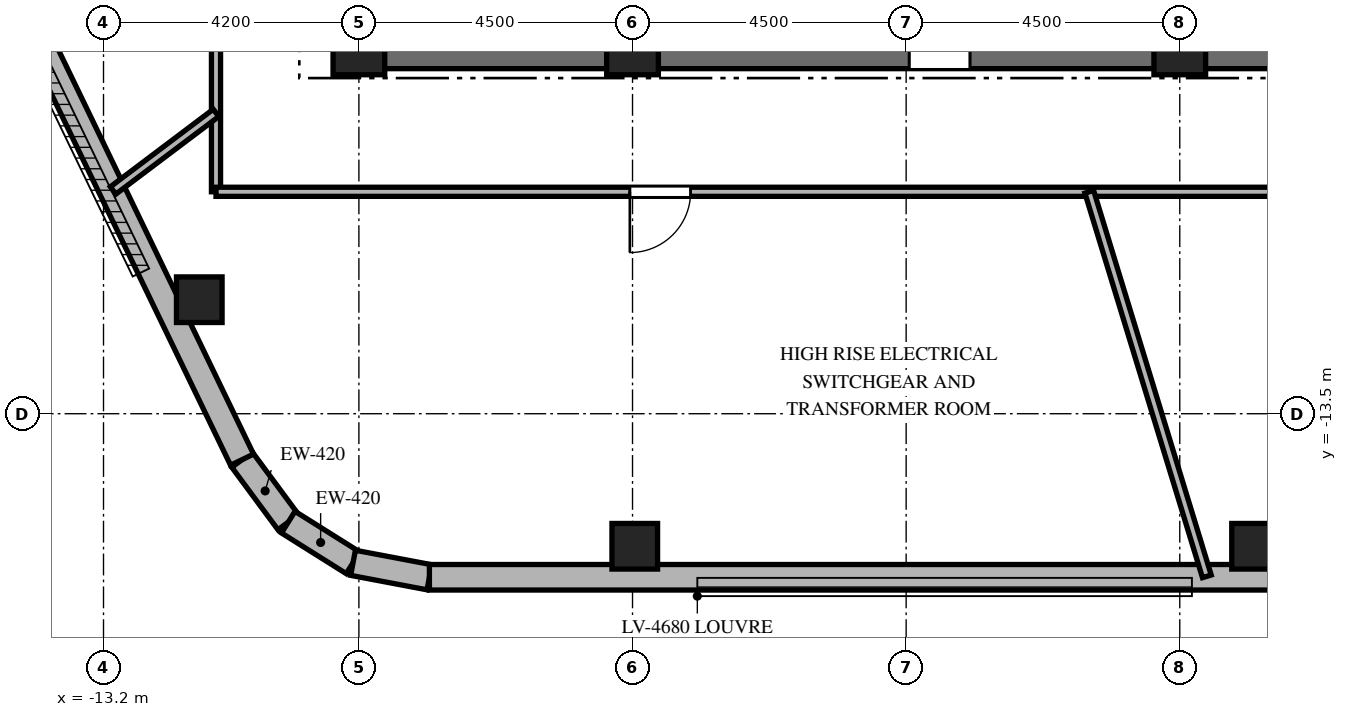
"""IFC4 building model, lengths in metres.
Left out: names, types, materials, properties, quantities, classifications, styles, units other than length and angle.
Written with IfcOpenShell. Run it as: python <this file> out.ifc"""

import sys

from ifc_helpers import new_model, si_unit, direction, frame, frame_2d, origin, origin_2d, place, context, subcontext, project, spatial, rectangle, extrude, element, fill, save


model = new_model("IFC4")
c1 = context("Model", 3, precision=1e-05, world=origin(), true_north=direction((0.0, 1.0)))
c2 = subcontext(c1, "Body", "Model", "MODEL_VIEW")
j1 = project(units=[si_unit("LENGTHUNIT", "METRE"), si_unit("PLANEANGLEUNIT", "RADIAN")], contexts=[c1])
p1 = place(None, origin())
s1 = spatial("IfcSite", under=j1, at=p1, CompositionType="ELEMENT")
p2 = place(p1, origin())
s2 = spatial("IfcBuilding", under=s1, at=p2, CompositionType="ELEMENT")
p3 = place(p2, frame((0.0, 0.0, 315.9)))
s3 = spatial("IfcBuildingStorey", under=s2, at=p3, CompositionType="ELEMENT", Elevation=315.9)
p4 = place(p3, frame((-9.325, -7.5, 0.0), z_axis=(0.0, 0.0, 1.0), x_axis=(1.0, 0.0, 0.0)))
e1 = element("IfcWall", 1, at=p4, inside=s3, PredefinedType="SHEAR", context=c2, shape_type="SweptSolid", body=[
    extrude(rectangle(XDim=18.65, YDim=0.65, at=frame_2d((9.325, 0.0))), origin(), (0.0, 0.0, 1.0), 5.5),
])
p5 = place(p4, frame((9.375, 0.0, 0.0)))
e2 = element("IfcOpeningElement", 2, at=p5, cuts=e1, PredefinedType="OPENING", context=c2, shape_type="SweptSolid", body=[
    extrude(rectangle(XDim=1.0, YDim=2.15, at=frame_2d((0.5, 1.075))), frame((0.0, 0.335, 0.0), z_axis=(0.0, -1.0, 0.0), x_axis=(1.0, 0.0, 0.0)), (0.0, 0.0, 1.0), 0.67),
])
for number, where, z_axis, x_axis in (
    (3, (-9.0, -7.5, 0.0), (0.0, 0.0, 1.0), (1.0, 0.0, 0.0)),
    (4, (-4.5, -7.5, 0.0), (0.0, 0.0, 1.0), (1.0, 0.0, 0.0)),
    (5, (4.5, -7.5, 0.0), (0.0, 0.0, 1.0), (1.0, 0.0, 0.0)),
):
    element("IfcColumn", number, at=place(p3, frame(where, z_axis=z_axis, x_axis=x_axis)), inside=s3, PredefinedType="COLUMN", context=c2, shape_type="SweptSolid", body=[
        extrude(rectangle(XDim=0.85, YDim=0.85, at=origin_2d()), origin(), (0.0, 0.0, 1.0), 5.5),
    ])
for number, where, z_axis, x_axis in (
    (6, (-4.463, -15.68, 0.0), (0.0, 0.0, 1.0), (1.0, 0.0, 0.0)),
    (7, (5.73, -15.68, 0.0), (0.0, 0.0, 1.0), (1.0, 0.0, 0.0)),
    (8, (-11.625, -11.625, 0.0), (0.0, 0.0, 1.0), (1.0, 0.0, 0.0)),
):
    element("IfcColumn", number, at=place(p3, frame(where, z_axis=z_axis, x_axis=x_axis)), inside=s3, PredefinedType="COLUMN", context=c2, shape_type="SweptSolid", body=[
        extrude(rectangle(XDim=0.75, YDim=0.75, at=origin_2d()), origin(), (0.0, 0.0, 1.0), 5.5),
    ])
p6 = place(p3, frame((-10.922, -14.256, 0.0), z_axis=(0.0, 0.0, 1.0), x_axis=(0.594423284796, -0.804152322941, 0.0)))
e9 = element("IfcWall", 9, at=p6, inside=s3, PredefinedType="SOLIDWALL", context=c2, shape_type="SweptSolid", body=[
    extrude(rectangle(XDim=1.278, YDim=0.42, at=frame_2d((0.639, 0.0))), origin(), (0.0, 0.0, 1.0), 5.18),
])
p7 = place(p3, frame((-10.162, -15.284, 0.0), z_axis=(0.0, 0.0, 1.0), x_axis=(0.846993641169, -0.53160302089, 0.0)))
e10 = element("IfcWall", 10, at=p7, inside=s3, PredefinedType="SOLIDWALL", context=c2, shape_type="SweptSolid", body=[
    extrude(rectangle(XDim=1.258, YDim=0.42, at=frame_2d((0.629, 0.0))), origin(), (0.0, 0.0, 1.0), 5.18),
])
p8 = place(p3, frame((-9.096, -15.952, 0.0), z_axis=(0.0, 0.0, 1.0), x_axis=(0.982583442004, -0.185821902637, 0.0)))
e11 = element("IfcWall", 11, at=p8, inside=s3, PredefinedType="SOLIDWALL", context=c2, shape_type="SweptSolid", body=[
    extrude(rectangle(XDim=1.278, YDim=0.42, at=frame_2d((0.639, 0.0))), origin(), (0.0, 0.0, 1.0), 5.18),
])
p9 = place(p3, frame((-7.84, -16.19, 0.0), z_axis=(0.0, 0.0, 1.0), x_axis=(1.0, 0.0, 0.0)))
e12 = element("IfcWall", 12, at=p9, inside=s3, PredefinedType="SOLIDWALL", context=c2, shape_type="SweptSolid", body=[
    extrude(rectangle(XDim=16.946, YDim=0.42, at=frame_2d((8.473, 0.0))), origin(), (0.0, 0.0, 1.0), 5.18),
])
p10 = place(p3, frame((-16.763, -2.152, 0.0), z_axis=(0.0, 0.0, 1.0), x_axis=(0.434664735238, -0.900592342817, 0.0)))
e13 = element("IfcWall", 13, at=p10, inside=s3, PredefinedType="SOLIDWALL", context=c2, shape_type="SweptSolid", body=[
    extrude(rectangle(XDim=13.44, YDim=0.42, at=frame_2d((6.72, 0.0))), origin(), (0.0, 0.0, 1.0), 5.18),
])
p11 = place(p3, frame((-11.35, -9.85, 0.0), z_axis=(0.0, 0.0, 1.0), x_axis=(0.0, 1.0, 0.0)))
e14 = element("IfcWall", 14, at=p11, inside=s3, PredefinedType="PARTITIONING", context=c2, shape_type="SweptSolid", body=[
    extrude(rectangle(XDim=19.7, YDim=0.15, at=frame_2d((9.85, 0.0))), origin(), (0.0, 0.0, 1.0), 4.67),
])
p12 = place(p11, frame((17.84, 0.0, 0.0)))
e15 = element("IfcOpeningElement", 15, at=p12, cuts=e14, PredefinedType="OPENING", context=c2, shape_type="SweptSolid", body=[
    extrude(rectangle(XDim=1.0, YDim=2.15, at=frame_2d((0.5, 1.075))), frame((0.0, 0.085, 0.0), z_axis=(0.0, -1.0, 0.0), x_axis=(1.0, 0.0, 0.0)), (0.0, 0.0, 1.0), 0.17),
])
p13 = place(p11, frame((8.752, 0.0, 0.0)))
e16 = element("IfcOpeningElement", 16, at=p13, cuts=e14, PredefinedType="OPENING", context=c2, shape_type="SweptSolid", body=[
    extrude(rectangle(XDim=1.0, YDim=2.15, at=frame_2d((0.5, 1.075))), frame((0.0, 0.085, 0.0), z_axis=(0.0, -1.0, 0.0), x_axis=(1.0, 0.0, 0.0)), (0.0, 0.0, 1.0), 0.17),
])
p14 = place(p3, frame((11.35, -9.85, 0.0), z_axis=(0.0, 0.0, 1.0), x_axis=(-1.0, 0.0, 0.0)))
e17 = element("IfcWall", 17, at=p14, inside=s3, PredefinedType="PARTITIONING", context=c2, shape_type="SweptSolid", body=[
    extrude(rectangle(XDim=22.7, YDim=0.15, at=frame_2d((11.35, 0.0))), origin(), (0.0, 0.0, 1.0), 4.67),
])
p15 = place(p14, frame((14.894, 0.0, 0.0)))
e18 = element("IfcOpeningElement", 18, at=p15, cuts=e17, PredefinedType="OPENING", context=c2, shape_type="SweptSolid", body=[
    extrude(rectangle(XDim=1.0, YDim=2.15, at=frame_2d((0.5, 1.075))), frame((0.0, 0.085, 0.0), z_axis=(0.0, -1.0, 0.0), x_axis=(1.0, 0.0, 0.0)), (0.0, 0.0, 1.0), 0.17),
])
p16 = place(p3, frame((-11.35, -8.553, 0.0), z_axis=(0.0, 0.0, 1.0), x_axis=(-0.798587297605, -0.601878997892, 0.0)))
e19 = element("IfcWall", 19, at=p16, inside=s3, PredefinedType="PARTITIONING", context=c2, shape_type="SweptSolid", body=[
    extrude(rectangle(XDim=2.119, YDim=0.15, at=frame_2d((1.059, 0.0))), origin(), (0.0, 0.0, 1.0), 4.52),
])
p17 = place(p3, frame((3.011, -9.85, 0.0), z_axis=(0.0, 0.0, 1.0), x_axis=(0.292386397132, -0.956300263919, 0.0)))
e20 = element("IfcWall", 20, at=p17, inside=s3, PredefinedType="PARTITIONING", context=c2, shape_type="SweptSolid", body=[
    extrude(rectangle(XDim=6.614, YDim=0.15, at=frame_2d((3.307, 0.0))), origin(), (0.0, 0.0, 1.0), 4.52),
])
p18 = place(p15, origin())
e21 = element("IfcDoor", 21, at=p18, inside=s3, OperationType="SINGLE_SWING_RIGHT", PredefinedType="DOOR", context=c2, shape_type="SweptSolid", body=[
    extrude(rectangle(XDim=1.0, YDim=2.15, at=frame_2d((0.5, 1.075))), frame((0.0, 0.025, 0.0), z_axis=(0.0, -1.0, 0.0), x_axis=(1.0, 0.0, 0.0)), (0.0, 0.0, 1.0), 0.05),
])
fill(e18, e21)
save(model, sys.argv[1])
